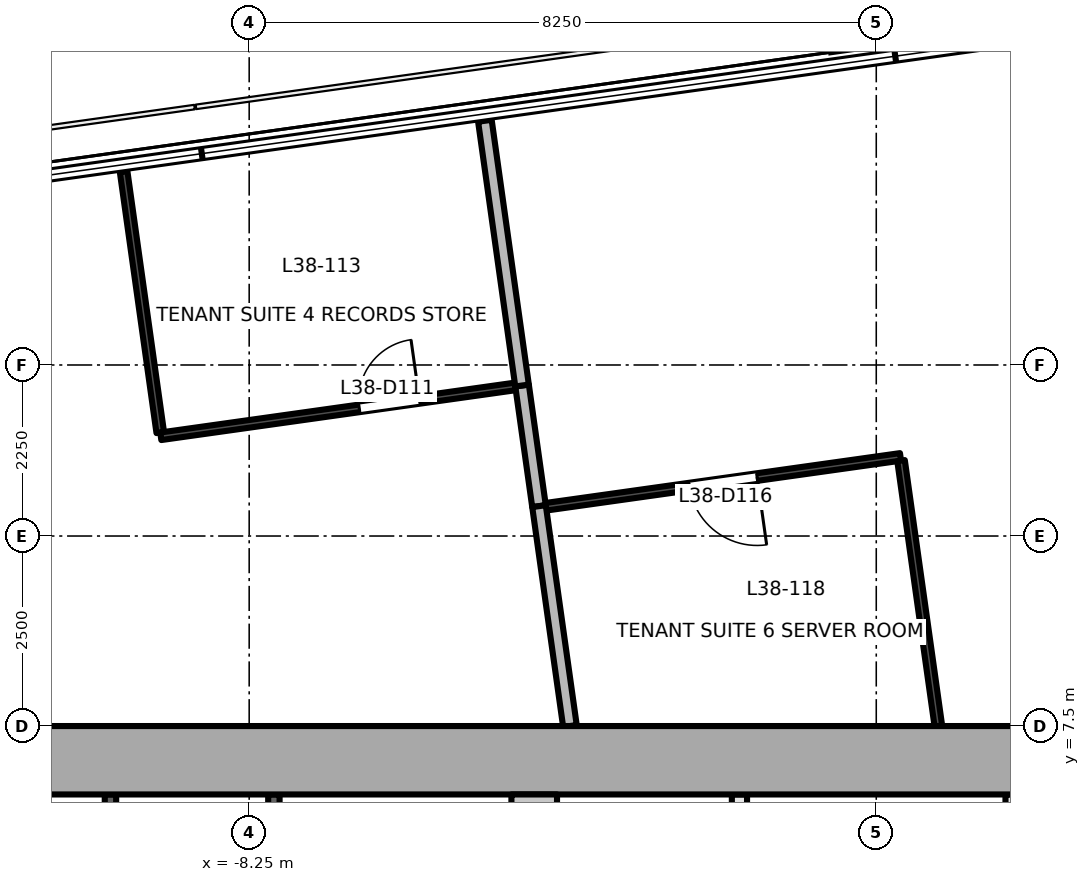
"""IFC4 building model, lengths in metres.
Left out: names, types, materials, properties, quantities, classifications, styles, units other than length and angle.
Written with IfcOpenShell. Run it as: python <this file> out.ifc"""

import sys

from ifc_helpers import new_model, si_unit, direction, frame, frame_2d, origin, origin_2d, place, context, subcontext, project, spatial, rectangle, extrude, element, fill, save


model = new_model("IFC4")
c1 = context("Model", 3, precision=1e-05, world=origin(), true_north=direction((0.0, 1.0)))
c2 = subcontext(c1, "Body", "Model", "MODEL_VIEW")
j1 = project(units=[si_unit("LENGTHUNIT", "METRE"), si_unit("PLANEANGLEUNIT", "RADIAN")], contexts=[c1])
p1 = place(None, origin())
s1 = spatial("IfcSite", under=j1, at=p1, CompositionType="ELEMENT")
p2 = place(p1, origin())
s2 = spatial("IfcBuilding", under=s1, at=p2, CompositionType="ELEMENT")
p3 = place(p2, frame((0.0, 0.0, 168.5)))
s3 = spatial("IfcBuildingStorey", under=s2, at=p3, CompositionType="ELEMENT", Elevation=168.5)
p4 = place(p3, frame((-0.125, 17.34, -0.2), z_axis=(0.0, 0.0, 1.0), x_axis=(0.99027049762, 0.139155817501, 0.0)))
e1 = element("IfcColumn", 1, at=p4, inside=s3, PredefinedType="COLUMN", context=c2, shape_type="SweptSolid", body=[
    extrude(rectangle(XDim=1.2, YDim=1.8, at=origin_2d()), origin(), (0.0, 0.0, 1.0), 3.9),
])
p5 = place(p3, frame((-18.0, 7.05, -0.2), z_axis=(0.0, 0.0, 1.0), x_axis=(1.0, 0.0, 0.0)))
e2 = element("IfcWall", 2, at=p5, inside=s3, PredefinedType="SHEAR", context=c2, shape_type="SweptSolid", body=[
    extrude(rectangle(XDim=36.0, YDim=0.9, at=frame_2d((18.0, 0.0))), origin(), (0.0, 0.0, 1.0), 3.9),
])
p6 = place(p3, frame((-4.5, -6.6, -0.2), z_axis=(0.0, 0.0, 1.0), x_axis=(0.0, 1.0, 0.0)))
e3 = element("IfcWall", 3, at=p6, inside=s3, PredefinedType="SHEAR", context=c2, shape_type="SweptSolid", body=[
    extrude(rectangle(XDim=13.2, YDim=0.6, at=frame_2d((6.6, 0.0))), origin(), (0.0, 0.0, 1.0), 3.9),
])
p7 = place(p3, frame((-10.075, -6.6, 0.0), z_axis=(0.0, 0.0, 1.0), x_axis=(0.0, 1.0, 0.0)))
e4 = element("IfcWall", 4, at=p7, inside=s3, PredefinedType="PARTITIONING", context=c2, shape_type="SweptSolid", body=[
    extrude(rectangle(XDim=13.2, YDim=0.15, at=frame_2d((6.6, 0.0))), origin(), (0.0, 0.0, 1.0), 3.7),
])
p8 = place(p7, frame((1.2, 0.0, 0.0)))
e5 = element("IfcOpeningElement", 5, at=p8, cuts=e4, PredefinedType="OPENING", context=c2, shape_type="SweptSolid", body=[
    extrude(rectangle(XDim=0.9, YDim=2.1, at=frame_2d((0.45, 1.05))), frame((0.0, 0.085, 0.0), z_axis=(0.0, -1.0, 0.0), x_axis=(1.0, 0.0, 0.0)), (0.0, 0.0, 1.0), 0.171),
])
p9 = place(p7, frame((4.5, 0.0, 0.0)))
e6 = element("IfcOpeningElement", 6, at=p9, cuts=e4, PredefinedType="OPENING", context=c2, shape_type="SweptSolid", body=[
    extrude(rectangle(XDim=0.9, YDim=2.1, at=frame_2d((0.45, 1.05))), frame((0.0, 0.085, 0.0), z_axis=(0.0, -1.0, 0.0), x_axis=(1.0, 0.0, 0.0)), (0.0, 0.0, 1.0), 0.171),
])
p10 = place(p7, frame((7.8, 0.0, 0.0)))
e7 = element("IfcOpeningElement", 7, at=p10, cuts=e4, PredefinedType="OPENING", context=c2, shape_type="SweptSolid", body=[
    extrude(rectangle(XDim=0.9, YDim=2.1, at=frame_2d((0.45, 1.05))), frame((0.0, 0.085, 0.0), z_axis=(0.0, -1.0, 0.0), x_axis=(1.0, 0.0, 0.0)), (0.0, 0.0, 1.0), 0.171),
])
p11 = place(p7, frame((11.1, 0.0, 0.0)))
e8 = element("IfcOpeningElement", 8, at=p11, cuts=e4, PredefinedType="OPENING", context=c2, shape_type="SweptSolid", body=[
    extrude(rectangle(XDim=0.9, YDim=2.1, at=frame_2d((0.45, 1.05))), frame((0.0, 0.085, 0.0), z_axis=(0.0, -1.0, 0.0), x_axis=(1.0, 0.0, 0.0)), (0.0, 0.0, 1.0), 0.171),
])
p12 = place(p3, frame((-7.925, -6.6, 0.0), z_axis=(0.0, 0.0, 1.0), x_axis=(0.0, 1.0, 0.0)))
e9 = element("IfcWall", 9, at=p12, inside=s3, PredefinedType="PARTITIONING", context=c2, shape_type="SweptSolid", body=[
    extrude(rectangle(XDim=13.2, YDim=0.15, at=frame_2d((6.6, 0.0))), origin(), (0.0, 0.0, 1.0), 3.7),
])
p13 = place(p12, frame((1.794, 0.0, 0.0)))
e10 = element("IfcOpeningElement", 10, at=p13, cuts=e9, PredefinedType="OPENING", context=c2, shape_type="SweptSolid", body=[
    extrude(rectangle(XDim=0.9, YDim=2.1, at=frame_2d((0.45, 1.05))), frame((0.0, 0.085, 0.0), z_axis=(0.0, -1.0, 0.0), x_axis=(1.0, 0.0, 0.0)), (0.0, 0.0, 1.0), 0.171),
])
p14 = place(p12, frame((6.216, 0.0, 0.0)))
e11 = element("IfcOpeningElement", 11, at=p14, cuts=e9, PredefinedType="OPENING", context=c2, shape_type="SweptSolid", body=[
    extrude(rectangle(XDim=0.9, YDim=2.1, at=frame_2d((0.45, 1.05))), frame((0.0, 0.085, 0.0), z_axis=(0.0, -1.0, 0.0), x_axis=(1.0, 0.0, 0.0)), (0.0, 0.0, 1.0), 0.171),
])
p15 = place(p12, frame((10.572, 0.0, 0.0)))
e12 = element("IfcOpeningElement", 12, at=p15, cuts=e9, PredefinedType="OPENING", context=c2, shape_type="SweptSolid", body=[
    extrude(rectangle(XDim=0.9, YDim=2.1, at=frame_2d((0.45, 1.05))), frame((0.0, 0.085, 0.0), z_axis=(0.0, -1.0, 0.0), x_axis=(1.0, 0.0, 0.0)), (0.0, 0.0, 1.0), 0.171),
])
p16 = place(p3, frame((-1.8, -6.6, 0.0), z_axis=(0.0, 0.0, 1.0), x_axis=(0.0, 1.0, 0.0)))
e13 = element("IfcWall", 13, at=p16, inside=s3, PredefinedType="PARTITIONING", context=c2, shape_type="SweptSolid", body=[
    extrude(rectangle(XDim=13.2, YDim=0.2, at=frame_2d((6.6, 0.0))), origin(), (0.0, 0.0, 1.0), 3.7),
])
p17 = place(p16, frame((0.55, 0.0, 0.0)))
e14 = element("IfcOpeningElement", 14, at=p17, cuts=e13, PredefinedType="OPENING", context=c2, shape_type="SweptSolid", body=[
    extrude(rectangle(XDim=0.9, YDim=2.1, at=frame_2d((0.45, 1.05))), frame((0.0, 0.111, 0.0), z_axis=(0.0, -1.0, 0.0), x_axis=(1.0, 0.0, 0.0)), (0.0, 0.0, 1.0), 0.221),
])
p18 = place(p16, frame((2.9, 0.0, 0.0)))
e15 = element("IfcOpeningElement", 15, at=p18, cuts=e13, PredefinedType="OPENING", context=c2, shape_type="SweptSolid", body=[
    extrude(rectangle(XDim=1.2, YDim=2.1, at=frame_2d((0.6, 1.05))), frame((0.0, 0.111, 0.0), z_axis=(0.0, -1.0, 0.0), x_axis=(1.0, 0.0, 0.0)), (0.0, 0.0, 1.0), 0.221),
])
p19 = place(p16, frame((5.7, 0.0, 0.0)))
e16 = element("IfcOpeningElement", 16, at=p19, cuts=e13, PredefinedType="OPENING", context=c2, shape_type="SweptSolid", body=[
    extrude(rectangle(XDim=1.2, YDim=2.1, at=frame_2d((0.6, 1.05))), frame((0.0, 0.111, 0.0), z_axis=(0.0, -1.0, 0.0), x_axis=(1.0, 0.0, 0.0)), (0.0, 0.0, 1.0), 0.221),
])
p20 = place(p16, frame((8.5, 0.0, 0.0)))
e17 = element("IfcOpeningElement", 17, at=p20, cuts=e13, PredefinedType="OPENING", context=c2, shape_type="SweptSolid", body=[
    extrude(rectangle(XDim=1.2, YDim=2.1, at=frame_2d((0.6, 1.05))), frame((0.0, 0.111, 0.0), z_axis=(0.0, -1.0, 0.0), x_axis=(1.0, 0.0, 0.0)), (0.0, 0.0, 1.0), 0.221),
])
p21 = place(p16, frame((11.3, 0.0, 0.0)))
e18 = element("IfcOpeningElement", 18, at=p21, cuts=e13, PredefinedType="OPENING", context=c2, shape_type="SweptSolid", body=[
    extrude(rectangle(XDim=1.2, YDim=2.1, at=frame_2d((0.6, 1.05))), frame((0.0, 0.111, 0.0), z_axis=(0.0, -1.0, 0.0), x_axis=(1.0, 0.0, 0.0)), (0.0, 0.0, 1.0), 0.221),
])
p22 = place(p3, frame((1.8, -6.6, 0.0), z_axis=(0.0, 0.0, 1.0), x_axis=(0.0, 1.0, 0.0)))
e19 = element("IfcWall", 19, at=p22, inside=s3, PredefinedType="PARTITIONING", context=c2, shape_type="SweptSolid", body=[
    extrude(rectangle(XDim=13.2, YDim=0.2, at=frame_2d((6.6, 0.0))), origin(), (0.0, 0.0, 1.0), 3.7),
])
p23 = place(p22, frame((0.55, 0.0, 0.0)))
e20 = element("IfcOpeningElement", 20, at=p23, cuts=e19, PredefinedType="OPENING", context=c2, shape_type="SweptSolid", body=[
    extrude(rectangle(XDim=0.9, YDim=2.1, at=frame_2d((0.45, 1.05))), frame((0.0, 0.111, 0.0), z_axis=(0.0, -1.0, 0.0), x_axis=(1.0, 0.0, 0.0)), (0.0, 0.0, 1.0), 0.221),
])
p24 = place(p22, frame((2.9, 0.0, 0.0)))
e21 = element("IfcOpeningElement", 21, at=p24, cuts=e19, PredefinedType="OPENING", context=c2, shape_type="SweptSolid", body=[
    extrude(rectangle(XDim=1.2, YDim=2.1, at=frame_2d((0.6, 1.05))), frame((0.0, 0.111, 0.0), z_axis=(0.0, -1.0, 0.0), x_axis=(1.0, 0.0, 0.0)), (0.0, 0.0, 1.0), 0.221),
])
p25 = place(p22, frame((5.7, 0.0, 0.0)))
e22 = element("IfcOpeningElement", 22, at=p25, cuts=e19, PredefinedType="OPENING", context=c2, shape_type="SweptSolid", body=[
    extrude(rectangle(XDim=1.2, YDim=2.1, at=frame_2d((0.6, 1.05))), frame((0.0, 0.111, 0.0), z_axis=(0.0, -1.0, 0.0), x_axis=(1.0, 0.0, 0.0)), (0.0, 0.0, 1.0), 0.221),
])
p26 = place(p22, frame((8.5, 0.0, 0.0)))
e23 = element("IfcOpeningElement", 23, at=p26, cuts=e19, PredefinedType="OPENING", context=c2, shape_type="SweptSolid", body=[
    extrude(rectangle(XDim=1.2, YDim=2.1, at=frame_2d((0.6, 1.05))), frame((0.0, 0.111, 0.0), z_axis=(0.0, -1.0, 0.0), x_axis=(1.0, 0.0, 0.0)), (0.0, 0.0, 1.0), 0.221),
])
p27 = place(p22, frame((11.3, 0.0, 0.0)))
e24 = element("IfcOpeningElement", 24, at=p27, cuts=e19, PredefinedType="OPENING", context=c2, shape_type="SweptSolid", body=[
    extrude(rectangle(XDim=1.2, YDim=2.1, at=frame_2d((0.6, 1.05))), frame((0.0, 0.111, 0.0), z_axis=(0.0, -1.0, 0.0), x_axis=(1.0, 0.0, 0.0)), (0.0, 0.0, 1.0), 0.221),
])
p28 = place(p3, frame((-9.902, 14.794, 0.0), z_axis=(0.0, 0.0, 1.0), x_axis=(0.139094045424, -0.990279176055, 0.0)))
e25 = element("IfcWall", 25, at=p28, inside=s3, PredefinedType="PARTITIONING", context=c2, shape_type="SweptSolid", body=[
    extrude(rectangle(XDim=3.467, YDim=0.1, at=frame_2d((1.733, 0.0))), origin(), (0.0, 0.0, 1.0), 3.7),
])
p29 = place(p3, frame((-9.413, 11.312, 0.0), z_axis=(0.0, 0.0, 1.0), x_axis=(0.99025300455, 0.139280246191, 0.0)))
e26 = element("IfcWall", 26, at=p29, inside=s3, PredefinedType="PARTITIONING", context=c2, shape_type="SweptSolid", body=[
    extrude(rectangle(XDim=4.71, YDim=0.1, at=frame_2d((2.355, 0.0))), origin(), (0.0, 0.0, 1.0), 3.3),
])
p30 = place(p29, frame((2.637, 0.0, 0.0)))
e27 = element("IfcOpeningElement", 27, at=p30, cuts=e26, PredefinedType="OPENING", context=c2, shape_type="SweptSolid", body=[
    extrude(rectangle(XDim=0.8, YDim=2.1, at=frame_2d((0.4, 1.05))), frame((0.0, 0.061, 0.0), z_axis=(0.0, -1.0, 0.0), x_axis=(1.0, 0.0, 0.0)), (0.0, 0.0, 1.0), 0.121),
])
p31 = place(p3, frame((-4.66, 11.98, 0.0), z_axis=(0.0, 0.0, 1.0), x_axis=(0.139096096116, -0.990278888013, 0.0)))
e28 = element("IfcWall", 28, at=p31, inside=s3, PredefinedType="PARTITIONING", context=c2, shape_type="SweptSolid", body=[
    extrude(rectangle(XDim=1.603, YDim=0.18, at=frame_2d((0.801, 0.0))), origin(), (0.0, 0.0, 1.0), 3.25),
])
p32 = place(p3, frame((-4.437, 10.393, 0.0), z_axis=(0.0, 0.0, 1.0), x_axis=(0.139303486007, -0.990249735565, 0.0)))
e29 = element("IfcWall", 29, at=p32, inside=s3, PredefinedType="PARTITIONING", context=c2, shape_type="SweptSolid", body=[
    extrude(rectangle(XDim=2.922, YDim=0.18, at=frame_2d((1.461, 0.0))), origin(), (0.0, 0.0, 1.0), 3.25),
])
p33 = place(p3, frame((-5.149, 15.463, 0.0), z_axis=(0.0, 0.0, 1.0), x_axis=(0.139039982937, -0.990286768136, 0.0)))
e30 = element("IfcWall", 30, at=p33, inside=s3, PredefinedType="PARTITIONING", context=c2, shape_type="SweptSolid", body=[
    extrude(rectangle(XDim=3.517, YDim=0.18, at=frame_2d((1.759, 0.0))), origin(), (0.0, 0.0, 1.0), 3.25),
])
p34 = place(p3, frame((0.319, 11.041, 0.0), z_axis=(0.0, 0.0, 1.0), x_axis=(-0.99025300455, -0.139280246191, 0.0)))
e31 = element("IfcWall", 31, at=p34, inside=s3, PredefinedType="PARTITIONING", context=c2, shape_type="SweptSolid", body=[
    extrude(rectangle(XDim=4.71, YDim=0.1, at=frame_2d((2.355, 0.0))), origin(), (0.0, 0.0, 1.0), 3.25),
])
p35 = place(p34, frame((1.905, 0.0, 0.0)))
e32 = element("IfcOpeningElement", 32, at=p35, cuts=e31, PredefinedType="OPENING", context=c2, shape_type="SweptSolid", body=[
    extrude(rectangle(XDim=0.9, YDim=2.1, at=frame_2d((0.45, 1.05))), frame((0.0, 0.061, 0.0), z_axis=(0.0, -1.0, 0.0), x_axis=(1.0, 0.0, 0.0)), (0.0, 0.0, 1.0), 0.121),
])
p36 = place(p3, frame((0.817, 7.5, 0.0), z_axis=(0.0, 0.0, 1.0), x_axis=(-0.139230432727, 0.990260009595, 0.0)))
e33 = element("IfcWall", 33, at=p36, inside=s3, PredefinedType="PARTITIONING", context=c2, shape_type="SweptSolid", body=[
    extrude(rectangle(XDim=3.526, YDim=0.1, at=frame_2d((1.763, 0.0))), origin(), (0.0, 0.0, 1.0), 3.7),
])
p37 = place(p30, origin())
e34 = element("IfcDoor", 34, at=p37, inside=s3, OperationType="SINGLE_SWING_RIGHT", PredefinedType="DOOR", context=c2, shape_type="SweptSolid", body=[
    extrude(rectangle(XDim=0.8, YDim=2.1, at=frame_2d((0.4, 1.05))), frame((0.0, 0.025, 0.0), z_axis=(0.0, -1.0, 0.0), x_axis=(1.0, 0.0, 0.0)), (0.0, 0.0, 1.0), 0.05),
])
fill(e27, e34)
p38 = place(p35, origin())
e35 = element("IfcDoor", 35, at=p38, inside=s3, OperationType="SINGLE_SWING_LEFT", PredefinedType="DOOR", context=c2, shape_type="SweptSolid", body=[
    extrude(rectangle(XDim=0.9, YDim=2.1, at=frame_2d((0.45, 1.05))), frame((0.0, 0.025, 0.0), z_axis=(0.0, -1.0, 0.0), x_axis=(1.0, 0.0, 0.0)), (0.0, 0.0, 1.0), 0.05),
])
fill(e32, e35)
save(model, sys.argv[1])
